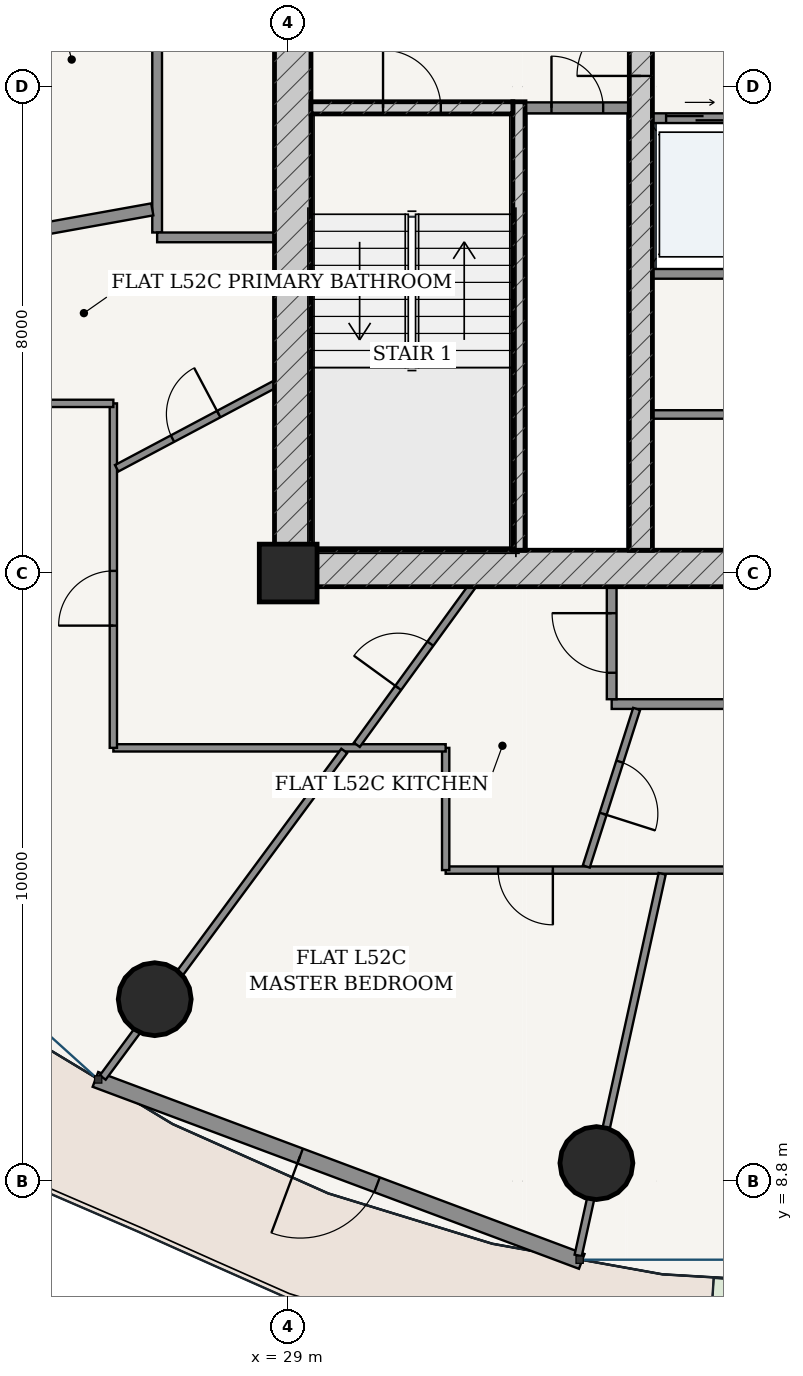
"""IFC4 building model, lengths in metres.
Left out: names, types, materials, properties, quantities, classifications, styles, units other than length and angle.
Written with IfcOpenShell. Run it as: python <this file> out.ifc"""

import sys

from ifc_helpers import new_model, si_unit, direction, frame, frame_2d, origin, origin_2d, place, context, subcontext, project, spatial, rectangle, hollow_circle, extrude, source, transform, mapped, element, fill, save


model = new_model("IFC4")
c1 = context("Model", 3, precision=1e-05, world=origin(), true_north=direction((-0.2419218956, 0.970295726276)))
c2 = subcontext(c1, "Body", "Model", "MODEL_VIEW")
j1 = project(units=[si_unit("LENGTHUNIT", "METRE"), si_unit("PLANEANGLEUNIT", "RADIAN")], contexts=[c1])
p1 = place(None, origin())
s1 = spatial("IfcSite", under=j1, at=p1, CompositionType="ELEMENT")
p2 = place(p1, origin())
s2 = spatial("IfcBuilding", under=s1, at=p2, CompositionType="ELEMENT")
p3 = place(p2, frame((0.0, 0.0, 198.6)))
s3 = spatial("IfcBuildingStorey", under=s2, at=p3, CompositionType="ELEMENT", Elevation=198.6)
p4 = place(p3, frame((29.0, 18.8, 0.0), z_axis=(0.0, 0.0, 1.0), x_axis=(1.0, 0.0, 0.0)))
e1 = element("IfcColumn", 1, at=p4, inside=s3, PredefinedType="COLUMN", context=c2, shape_type="SweptSolid", body=[
    extrude(rectangle(XDim=0.95, YDim=0.95, at=origin_2d()), origin(), (0.0, 0.0, 1.0), 3.7),
])
p5 = place(p3, frame((28.775, 18.875, 0.0), z_axis=(0.0, 0.0, 1.0), x_axis=(1.0, 0.0, 0.0)))
e2 = element("IfcWall", 2, at=p5, inside=s3, PredefinedType="SHEAR", context=c2, shape_type="SweptSolid", body=[
    extrude(rectangle(XDim=18.45, YDim=0.6, at=frame_2d((9.225, 0.0))), origin(), (0.0, 0.0, 1.0), 3.435),
])
p6 = place(p5, frame((8.8, 0.0, 0.0)))
e3 = element("IfcOpeningElement", 3, at=p6, cuts=e2, PredefinedType="OPENING", context=c2, shape_type="SweptSolid", body=[
    extrude(rectangle(XDim=0.85, YDim=2.1, at=frame_2d((0.425, 1.05))), frame((0.0, 0.31, 0.0), z_axis=(0.0, -1.0, 0.0), x_axis=(1.0, 0.0, 0.0)), (0.0, 0.0, 1.0), 0.62),
])
p7 = place(p3, frame((29.075, 19.175, 0.0), z_axis=(0.0, 0.0, 1.0), x_axis=(0.0, 1.0, 0.0)))
e4 = element("IfcWall", 4, at=p7, inside=s3, PredefinedType="SHEAR", context=c2, shape_type="SweptSolid", body=[
    extrude(rectangle(XDim=15.25, YDim=0.6, at=frame_2d((7.625, 0.0))), origin(), (0.0, 0.0, 1.0), 3.435),
])
p8 = place(p7, frame((9.875, 0.0, 0.0)))
e5 = element("IfcOpeningElement", 5, at=p8, cuts=e4, PredefinedType="OPENING", context=c2, shape_type="SweptSolid", body=[
    extrude(rectangle(XDim=1.5, YDim=2.2, at=frame_2d((0.75, 1.1))), frame((0.0, 0.31, 0.0), z_axis=(0.0, -1.0, 0.0), x_axis=(1.0, 0.0, 0.0)), (0.0, 0.0, 1.0), 0.62),
])
p9 = place(p3, frame((32.795, 19.175, 0.0), z_axis=(0.0, 0.0, 1.0), x_axis=(0.0, 1.0, 0.0)))
e6 = element("IfcWall", 6, at=p9, inside=s3, PredefinedType="SOLIDWALL", context=c2, shape_type="SweptSolid", body=[
    extrude(rectangle(XDim=7.375, YDim=0.2, at=frame_2d((3.688, 0.0))), origin(), (0.0, 0.0, 1.0), 3.435),
])
p10 = place(p3, frame((29.375, 26.45, 0.0), z_axis=(0.0, 0.0, 1.0), x_axis=(1.0, 0.0, 0.0)))
e7 = element("IfcWall", 7, at=p10, inside=s3, PredefinedType="SOLIDWALL", context=c2, shape_type="SweptSolid", body=[
    extrude(rectangle(XDim=3.32, YDim=0.2, at=frame_2d((1.66, 0.0))), origin(), (0.0, 0.0, 1.0), 3.435),
])
p11 = place(p10, frame((1.185, 0.0, 0.0)))
e8 = element("IfcOpeningElement", 8, at=p11, cuts=e7, PredefinedType="OPENING", context=c2, shape_type="SweptSolid", body=[
    extrude(rectangle(XDim=0.95, YDim=2.15, at=frame_2d((0.475, 1.075))), frame((0.0, 0.11, 0.0), z_axis=(0.0, -1.0, 0.0), x_axis=(1.0, 0.0, 0.0)), (0.0, 0.0, 1.0), 0.22),
])
p12 = place(p3, frame((34.8, 19.175, 0.0), z_axis=(0.0, 0.0, 1.0), x_axis=(0.0, 1.0, 0.0)))
e9 = element("IfcWall", 9, at=p12, inside=s3, PredefinedType="SHEAR", context=c2, shape_type="SweptSolid", body=[
    extrude(rectangle(XDim=15.25, YDim=0.38, at=frame_2d((7.625, 0.0))), origin(), (0.0, 0.0, 1.0), 3.435),
])
p13 = place(p12, frame((7.8, 0.0, 0.0)))
e10 = element("IfcOpeningElement", 10, at=p13, cuts=e9, PredefinedType="OPENING", context=c2, shape_type="SweptSolid", body=[
    extrude(rectangle(XDim=1.05, YDim=2.15, at=frame_2d((0.525, 1.075))), frame((0.0, 0.2, 0.0), z_axis=(0.0, -1.0, 0.0), x_axis=(1.0, 0.0, 0.0)), (0.0, 0.0, 1.0), 0.4),
])
for number, where, z_axis, x_axis in (
    (11, (26.805, 11.792, 0.0), (0.0, 0.0, 1.0), (1.0, 0.0, 0.0)),
    (12, (34.069, 9.097, 0.0), (0.0, 0.0, 1.0), (1.0, 0.0, 0.0)),
):
    element("IfcColumn", number, at=place(p3, frame(where, z_axis=z_axis, x_axis=x_axis)), inside=s3, PredefinedType="COLUMN", context=c2, shape_type="SweptSolid", body=[
        extrude(hollow_circle(Radius=0.6, WallThickness=0.038, at=origin_2d()), origin(), (0.0, 0.0, 1.0), 3.7),
    ])
p14 = place(p3, frame((25.83, 10.473, 0.0), z_axis=(0.0, 0.0, 1.0), x_axis=(0.936556918375, -0.350515532672, 0.0)))
e13 = element("IfcWall", 13, at=p14, inside=s3, PredefinedType="SOLIDWALL", context=c2, shape_type="SweptSolid", body=[
    extrude(rectangle(XDim=8.539, YDim=0.26, at=frame_2d((4.27, 0.0))), origin(), (0.0, 0.0, 1.0), 3.435),
])
p15 = place(p14, frame((3.594, 0.0, 0.0)))
e14 = element("IfcOpeningElement", 14, at=p15, cuts=e13, PredefinedType="OPENING", context=c2, shape_type="SweptSolid", body=[
    extrude(rectangle(XDim=1.35, YDim=2.2, at=frame_2d((0.675, 1.1))), frame((0.0, 0.14, 0.0), z_axis=(0.0, -1.0, 0.0), x_axis=(1.0, 0.0, 0.0)), (0.0, 0.0, 1.0), 0.28),
])
p16 = place(p3, frame((32.9, 26.45, 0.0), z_axis=(0.0, 0.0, 1.0), x_axis=(1.0, 0.0, 0.0)))
e15 = element("IfcWall", 15, at=p16, inside=s3, PredefinedType="PARTITIONING", context=c2, shape_type="SweptSolid", body=[
    extrude(rectangle(XDim=1.71, YDim=0.18, at=frame_2d((0.855, 0.0))), origin(), (0.0, 0.0, 1.0), 3.435),
])
p17 = place(p16, frame((0.43, 0.0, 0.0)))
e16 = element("IfcOpeningElement", 16, at=p17, cuts=e15, PredefinedType="OPENING", context=c2, shape_type="SweptSolid", body=[
    extrude(rectangle(XDim=0.85, YDim=2.1, at=frame_2d((0.425, 1.05))), frame((0.0, 0.1, 0.0), z_axis=(0.0, -1.0, 0.0), x_axis=(1.0, 0.0, 0.0)), (0.0, 0.0, 1.0), 0.2),
])
p18 = place(p3, frame((34.99, 26.28, 0.0), z_axis=(0.0, 0.0, 1.0), x_axis=(1.0, 0.0, 0.0)))
e17 = element("IfcWall", 17, at=p18, inside=s3, PredefinedType="PARTITIONING", context=c2, shape_type="SweptSolid", body=[
    extrude(rectangle(XDim=6.02, YDim=0.16, at=frame_2d((3.01, 0.0))), origin(), (0.0, 0.0, 1.0), 3.435),
])
p19 = place(p18, frame((0.225, 0.0, 0.0)))
e18 = element("IfcOpeningElement", 18, at=p19, cuts=e17, PredefinedType="OPENING", context=c2, shape_type="SweptSolid", body=[
    extrude(rectangle(XDim=1.1, YDim=2.2, at=frame_2d((0.55, 1.1))), frame((0.0, 0.09, 0.0), z_axis=(0.0, -1.0, 0.0), x_axis=(1.0, 0.0, 0.0)), (0.0, 0.0, 1.0), 0.18),
])
p20 = place(p18, frame((1.705, 0.0, 0.0)))
e19 = element("IfcOpeningElement", 19, at=p20, cuts=e17, PredefinedType="OPENING", context=c2, shape_type="SweptSolid", body=[
    extrude(rectangle(XDim=1.1, YDim=2.2, at=frame_2d((0.55, 1.1))), frame((0.0, 0.09, 0.0), z_axis=(0.0, -1.0, 0.0), x_axis=(1.0, 0.0, 0.0)), (0.0, 0.0, 1.0), 0.18),
])
p21 = place(p3, frame((34.99, 23.72, 0.0), z_axis=(0.0, 0.0, 1.0), x_axis=(1.0, 0.0, 0.0)))
e20 = element("IfcWall", 20, at=p21, inside=s3, PredefinedType="PARTITIONING", context=c2, shape_type="SweptSolid", body=[
    extrude(rectangle(XDim=6.02, YDim=0.16, at=frame_2d((3.01, 0.0))), origin(), (0.0, 0.0, 1.0), 3.435),
])
p22 = place(p3, frame((34.99, 21.407, 0.0), z_axis=(0.0, 0.0, 1.0), x_axis=(1.0, 0.0, 0.0)))
e21 = element("IfcWall", 21, at=p22, inside=s3, PredefinedType="PARTITIONING", context=c2, shape_type="SweptSolid", body=[
    extrude(rectangle(XDim=6.02, YDim=0.14, at=frame_2d((3.01, 0.0))), origin(), (0.0, 0.0, 1.0), 3.435),
])
p23 = place(p22, frame((2.585, 0.0, 0.0)))
e22 = element("IfcOpeningElement", 22, at=p23, cuts=e21, PredefinedType="OPENING", context=c2, shape_type="SweptSolid", body=[
    extrude(rectangle(XDim=0.85, YDim=2.1, at=frame_2d((0.425, 1.05))), frame((0.0, 0.08, 0.0), z_axis=(0.0, -1.0, 0.0), x_axis=(1.0, 0.0, 0.0)), (0.0, 0.0, 1.0), 0.16),
])
p24 = place(p3, frame((26.845, 24.4, 0.0), z_axis=(0.0, 0.0, 1.0), x_axis=(0.0, 1.0, 0.0)))
e23 = element("IfcWall", 23, at=p24, inside=s3, PredefinedType="PARTITIONING", context=c2, shape_type="SweptSolid", body=[
    extrude(rectangle(XDim=10.625, YDim=0.16, at=frame_2d((5.312, 0.0))), origin(), (0.0, 0.0, 1.0), 2.951),
])
p25 = place(p3, frame((26.845, 24.32, 0.0), z_axis=(0.0, 0.0, 1.0), x_axis=(1.0, 0.0, 0.0)))
e24 = element("IfcWall", 24, at=p25, inside=s3, PredefinedType="PARTITIONING", context=c2, shape_type="SweptSolid", body=[
    extrude(rectangle(XDim=1.93, YDim=0.16, at=frame_2d((0.965, 0.0))), origin(), (0.0, 0.0, 1.0), 3.435),
])
p26 = place(p3, frame((34.32, 16.645, 0.0), z_axis=(0.0, 0.0, 1.0), x_axis=(1.0, 0.0, 0.0)))
e25 = element("IfcWall", 25, at=p26, inside=s3, PredefinedType="PARTITIONING", context=c2, shape_type="SweptSolid", body=[
    extrude(rectangle(XDim=14.835, YDim=0.16, at=frame_2d((7.417, 0.0))), origin(), (0.0, 0.0, 1.0), 2.951),
])
p27 = place(p26, frame((11.961, 0.0, 0.0)))
e26 = element("IfcOpeningElement", 26, at=p27, cuts=e25, PredefinedType="OPENING", context=c2, shape_type="SweptSolid", body=[
    extrude(rectangle(XDim=0.98, YDim=2.2, at=frame_2d((0.49, 1.1))), frame((0.0, 0.09, 0.0), z_axis=(0.0, -1.0, 0.0), x_axis=(1.0, 0.0, 0.0)), (0.0, 0.0, 1.0), 0.18),
])
p28 = place(p3, frame((34.32, 16.725, 0.0), z_axis=(0.0, 0.0, 1.0), x_axis=(0.0, 1.0, 0.0)))
e27 = element("IfcWall", 27, at=p28, inside=s3, PredefinedType="PARTITIONING", context=c2, shape_type="SweptSolid", body=[
    extrude(rectangle(XDim=1.85, YDim=0.16, at=frame_2d((0.925, 0.0))), origin(), (0.0, 0.0, 1.0), 3.435),
])
p29 = place(p28, frame((0.435, 0.0, 0.0)))
e28 = element("IfcOpeningElement", 28, at=p29, cuts=e27, PredefinedType="OPENING", context=c2, shape_type="SweptSolid", body=[
    extrude(rectangle(XDim=0.98, YDim=2.2, at=frame_2d((0.49, 1.1))), frame((0.0, 0.09, 0.0), z_axis=(0.0, -1.0, 0.0), x_axis=(1.0, 0.0, 0.0)), (0.0, 0.0, 1.0), 0.18),
])
p30 = place(p3, frame((26.765, 24.781, 0.0), z_axis=(0.0, 0.0, 1.0), x_axis=(-0.984226684914, -0.176911934879, 0.0)))
e29 = element("IfcWall", 29, at=p30, inside=s3, PredefinedType="PARTITIONING", context=c2, shape_type="SweptSolid", body=[
    extrude(rectangle(XDim=10.202, YDim=0.2, at=frame_2d((5.101, 0.0))), origin(), (0.0, 0.0, 1.0), 2.951),
])
p31 = place(p3, frame((40.734, 13.915, 0.0), z_axis=(0.0, 0.0, 1.0), x_axis=(-1.0, 0.0, 0.0)))
e30 = element("IfcWall", 30, at=p31, inside=s3, PredefinedType="PARTITIONING", context=c2, shape_type="SweptSolid", body=[
    extrude(rectangle(XDim=9.144, YDim=0.12, at=frame_2d((4.572, 0.0))), origin(), (0.0, 0.0, 1.0), 2.951),
])
p32 = place(p31, frame((7.381, 0.0, 0.0)))
e31 = element("IfcOpeningElement", 31, at=p32, cuts=e30, PredefinedType="OPENING", context=c2, shape_type="SweptSolid", body=[
    extrude(rectangle(XDim=0.9, YDim=2.15, at=frame_2d((0.45, 1.075))), frame((0.0, 0.07, 0.0), z_axis=(0.0, -1.0, 0.0), x_axis=(1.0, 0.0, 0.0)), (0.0, 0.0, 1.0), 0.14),
])
p33 = place(p31, frame((2.458, 0.0, 0.0)))
e32 = element("IfcOpeningElement", 32, at=p33, cuts=e30, PredefinedType="OPENING", context=c2, shape_type="SweptSolid", body=[
    extrude(rectangle(XDim=0.9, YDim=2.15, at=frame_2d((0.45, 1.075))), frame((0.0, 0.07, 0.0), z_axis=(0.0, -1.0, 0.0), x_axis=(1.0, 0.0, 0.0)), (0.0, 0.0, 1.0), 0.14),
])
p34 = place(p3, frame((31.59, 13.915, 0.0), z_axis=(0.0, 0.0, 1.0), x_axis=(0.0, 1.0, 0.0)))
e33 = element("IfcWall", 33, at=p34, inside=s3, PredefinedType="PARTITIONING", context=c2, shape_type="SweptSolid", body=[
    extrude(rectangle(XDim=2.01, YDim=0.12, at=frame_2d((1.005, 0.0))), origin(), (0.0, 0.0, 1.0), 3.11),
])
p35 = place(p3, frame((31.59, 15.925, 0.0), z_axis=(0.0, 0.0, 1.0), x_axis=(-1.0, 0.0, 0.0)))
e34 = element("IfcWall", 34, at=p35, inside=s3, PredefinedType="PARTITIONING", context=c2, shape_type="SweptSolid", body=[
    extrude(rectangle(XDim=5.465, YDim=0.12, at=frame_2d((2.732, 0.0))), origin(), (0.0, 0.0, 1.0), 2.951),
])
p36 = place(p3, frame((26.125, 15.925, 0.0), z_axis=(0.0, 0.0, 1.0), x_axis=(0.0, 1.0, 0.0)))
e35 = element("IfcWall", 35, at=p36, inside=s3, PredefinedType="PARTITIONING", context=c2, shape_type="SweptSolid", body=[
    extrude(rectangle(XDim=5.665, YDim=0.12, at=frame_2d((2.833, 0.0))), origin(), (0.0, 0.0, 1.0), 2.951),
])
p37 = place(p36, frame((2.01, 0.0, 0.0)))
e36 = element("IfcOpeningElement", 36, at=p37, cuts=e35, PredefinedType="OPENING", context=c2, shape_type="SweptSolid", body=[
    extrude(rectangle(XDim=0.9, YDim=2.15, at=frame_2d((0.45, 1.075))), frame((0.0, 0.07, 0.0), z_axis=(0.0, -1.0, 0.0), x_axis=(1.0, 0.0, 0.0)), (0.0, 0.0, 1.0), 0.14),
])
p38 = place(p3, frame((26.125, 21.59, 0.0), z_axis=(0.0, 0.0, 1.0), x_axis=(-1.0, 0.0, 0.0)))
e37 = element("IfcWall", 37, at=p38, inside=s3, PredefinedType="PARTITIONING", context=c2, shape_type="SweptSolid", body=[
    extrude(rectangle(XDim=2.01, YDim=0.12, at=frame_2d((1.005, 0.0))), origin(), (0.0, 0.0, 1.0), 3.11),
])
p39 = place(p3, frame((29.922, 15.875, 0.0), z_axis=(0.0, 0.0, 1.0), x_axis=(-0.594524636617, -0.804077394568, 0.0)))
e38 = element("IfcWall", 38, at=p39, inside=s3, PredefinedType="PARTITIONING", context=c2, shape_type="SweptSolid", body=[
    extrude(rectangle(XDim=6.68, YDim=0.12, at=frame_2d((3.34, 0.0))), origin(), (0.0, 0.0, 1.0), 2.951),
])
p40 = place(p3, frame((35.15, 13.854, 0.0), z_axis=(0.0, 0.0, 1.0), x_axis=(-0.214942949264, -0.976626606519, 0.0)))
e39 = element("IfcWall", 39, at=p40, inside=s3, PredefinedType="PARTITIONING", context=c2, shape_type="SweptSolid", body=[
    extrude(rectangle(XDim=6.427, YDim=0.12, at=frame_2d((3.213, 0.0))), origin(), (0.0, 0.0, 1.0), 2.951),
])
p41 = place(p3, frame((28.775, 21.901, 0.0), z_axis=(0.0, 0.0, 1.0), x_axis=(-0.883156592468, -0.46907828044, 0.0)))
e40 = element("IfcWall", 40, at=p41, inside=s3, PredefinedType="PARTITIONING", context=c2, shape_type="SweptSolid", body=[
    extrude(rectangle(XDim=2.938, YDim=0.12, at=frame_2d((1.469, 0.0))), origin(), (0.0, 0.0, 1.0), 3.435),
])
p42 = place(p41, frame((1.039, 0.0, 0.0)))
e41 = element("IfcOpeningElement", 41, at=p42, cuts=e40, PredefinedType="OPENING", context=c2, shape_type="SweptSolid", body=[
    extrude(rectangle(XDim=0.86, YDim=2.15, at=frame_2d((0.43, 1.075))), frame((0.0, 0.07, 0.0), z_axis=(0.0, -1.0, 0.0), x_axis=(1.0, 0.0, 0.0)), (0.0, 0.0, 1.0), 0.14),
])
p43 = place(p3, frame((32.019, 18.575, 0.0), z_axis=(0.0, 0.0, 1.0), x_axis=(-0.588135570825, -0.808762357143, 0.0)))
e42 = element("IfcWall", 42, at=p43, inside=s3, PredefinedType="PARTITIONING", context=c2, shape_type="SweptSolid", body=[
    extrude(rectangle(XDim=3.215, YDim=0.12, at=frame_2d((1.607, 0.0))), origin(), (0.0, 0.0, 1.0), 3.435),
])
p44 = place(p43, frame((1.157, 0.0, 0.0)))
e43 = element("IfcOpeningElement", 43, at=p44, cuts=e42, PredefinedType="OPENING", context=c2, shape_type="SweptSolid", body=[
    extrude(rectangle(XDim=0.9, YDim=2.15, at=frame_2d((0.45, 1.075))), frame((0.0, 0.07, 0.0), z_axis=(0.0, -1.0, 0.0), x_axis=(1.0, 0.0, 0.0)), (0.0, 0.0, 1.0), 0.14),
])
p45 = place(p3, frame((34.73, 16.565, 0.0), z_axis=(0.0, 0.0, 1.0), x_axis=(-0.304300161081, -0.952576197459, 0.0)))
e44 = element("IfcWall", 44, at=p45, inside=s3, PredefinedType="PARTITIONING", context=c2, shape_type="SweptSolid", body=[
    extrude(rectangle(XDim=2.72, YDim=0.12, at=frame_2d((1.36, 0.0))), origin(), (0.0, 0.0, 1.0), 3.11),
])
p46 = place(p45, frame((0.91, 0.0, 0.0)))
e45 = element("IfcOpeningElement", 45, at=p46, cuts=e44, PredefinedType="OPENING", context=c2, shape_type="SweptSolid", body=[
    extrude(rectangle(XDim=0.9, YDim=2.15, at=frame_2d((0.45, 1.075))), frame((0.0, 0.07, 0.0), z_axis=(0.0, -1.0, 0.0), x_axis=(1.0, 0.0, 0.0)), (0.0, 0.0, 1.0), 0.14),
])
m1 = source(origin(), c2, "Body", "SweptSolid", [
    extrude(rectangle(XDim=1.35, YDim=2.2, at=frame_2d((0.675, 1.1))), frame((0.0, 0.025, 0.0), z_axis=(0.0, -1.0, 0.0), x_axis=(1.0, 0.0, 0.0)), (0.0, 0.0, 1.0), 0.05),
])
p47 = place(p15, frame((1.35, 0.0, 0.0), z_axis=(0.0, 0.0, 1.0), x_axis=(-1.0, 0.0, 0.0)))
e46 = element("IfcDoor", 46, at=p47, inside=s3, OperationType="SINGLE_SWING_RIGHT", PredefinedType="DOOR", context=c2, shape_type="MappedRepresentation", body=[
    mapped(m1, transform((0.0, 0.0, 0.0), scale=1.0)),
])
fill(e14, e46)
m2 = source(origin(), c2, "Body", "SweptSolid", [
    extrude(rectangle(XDim=1.05, YDim=2.15, at=frame_2d((0.525, 1.075))), frame((0.0, 0.025, 0.0), z_axis=(0.0, -1.0, 0.0), x_axis=(1.0, 0.0, 0.0)), (0.0, 0.0, 1.0), 0.05),
])
p48 = place(p13, origin())
e47 = element("IfcDoor", 47, at=p48, inside=s3, OperationType="SINGLE_SWING_LEFT", PredefinedType="DOOR", context=c2, shape_type="MappedRepresentation", body=[
    mapped(m2, transform((0.0, 0.0, 0.0), scale=1.0)),
])
fill(e10, e47)
m3 = source(origin(), c2, "Body", "SweptSolid", [
    extrude(rectangle(XDim=0.95, YDim=2.15, at=frame_2d((0.475, 1.075))), frame((0.0, 0.025, 0.0), z_axis=(0.0, -1.0, 0.0), x_axis=(1.0, 0.0, 0.0)), (0.0, 0.0, 1.0), 0.05),
])
p49 = place(p11, origin())
e48 = element("IfcDoor", 48, at=p49, inside=s3, OperationType="SINGLE_SWING_LEFT", PredefinedType="DOOR", context=c2, shape_type="MappedRepresentation", body=[
    mapped(m3, transform((0.0, 0.0, 0.0), scale=1.0)),
])
fill(e8, e48)
m4 = source(origin(), c2, "Body", "SweptSolid", [
    extrude(rectangle(XDim=0.85, YDim=2.1, at=frame_2d((0.425, 1.05))), frame((0.0, 0.025, 0.0), z_axis=(0.0, -1.0, 0.0), x_axis=(1.0, 0.0, 0.0)), (0.0, 0.0, 1.0), 0.05),
])
p50 = place(p17, origin())
e49 = element("IfcDoor", 49, at=p50, inside=s3, OperationType="SINGLE_SWING_LEFT", PredefinedType="DOOR", context=c2, shape_type="MappedRepresentation", body=[
    mapped(m4, transform((0.0, 0.0, 0.0), scale=1.0)),
])
fill(e16, e49)
m5 = source(origin(), c2, "Body", "SweptSolid", [
    extrude(rectangle(XDim=1.1, YDim=2.2, at=frame_2d((0.55, 1.1))), frame((0.0, 0.025, 0.0), z_axis=(0.0, -1.0, 0.0), x_axis=(1.0, 0.0, 0.0)), (0.0, 0.0, 1.0), 0.05),
])
p51 = place(p19, origin())
e50 = element("IfcDoor", 50, at=p51, inside=s3, OperationType="DOUBLE_DOOR_SLIDING", PredefinedType="DOOR", context=c2, shape_type="MappedRepresentation", body=[
    mapped(m5, transform((0.0, 0.0, 0.0), scale=1.0)),
])
fill(e18, e50)
m6 = source(origin(), c2, "Body", "SweptSolid", [
    extrude(rectangle(XDim=0.98, YDim=2.2, at=frame_2d((0.49, 1.1))), frame((0.0, 0.025, 0.0), z_axis=(0.0, -1.0, 0.0), x_axis=(1.0, 0.0, 0.0)), (0.0, 0.0, 1.0), 0.05),
])
p52 = place(p29, origin())
e51 = element("IfcDoor", 51, at=p52, inside=s3, OperationType="SINGLE_SWING_RIGHT", PredefinedType="DOOR", context=c2, shape_type="MappedRepresentation", body=[
    mapped(m6, transform((0.0, 0.0, 0.0), scale=1.0)),
])
fill(e28, e51)
m7 = source(origin(), c2, "Body", "SweptSolid", [
    extrude(rectangle(XDim=0.9, YDim=2.15, at=frame_2d((0.45, 1.075))), frame((0.0, 0.025, 0.0), z_axis=(0.0, -1.0, 0.0), x_axis=(1.0, 0.0, 0.0)), (0.0, 0.0, 1.0), 0.05),
])
p53 = place(p44, frame((0.9, 0.0, 0.0), z_axis=(0.0, 0.0, 1.0), x_axis=(-1.0, 0.0, 0.0)))
e52 = element("IfcDoor", 52, at=p53, inside=s3, OperationType="SINGLE_SWING_LEFT", PredefinedType="DOOR", context=c2, shape_type="MappedRepresentation", body=[
    mapped(m7, transform((0.0, 0.0, 0.0), scale=1.0)),
])
fill(e43, e52)
p54 = place(p46, origin())
e53 = element("IfcDoor", 53, at=p54, inside=s3, OperationType="SINGLE_SWING_RIGHT", PredefinedType="DOOR", context=c2, shape_type="MappedRepresentation", body=[
    mapped(m7, transform((0.0, 0.0, 0.0), scale=1.0)),
])
fill(e45, e53)
p55 = place(p32, origin())
e54 = element("IfcDoor", 54, at=p55, inside=s3, OperationType="SINGLE_SWING_LEFT", PredefinedType="DOOR", context=c2, shape_type="MappedRepresentation", body=[
    mapped(m7, transform((0.0, 0.0, 0.0), scale=1.0)),
])
fill(e31, e54)
m8 = source(origin(), c2, "Body", "SweptSolid", [
    extrude(rectangle(XDim=0.86, YDim=2.15, at=frame_2d((0.43, 1.075))), frame((0.0, 0.025, 0.0), z_axis=(0.0, -1.0, 0.0), x_axis=(1.0, 0.0, 0.0)), (0.0, 0.0, 1.0), 0.05),
])
p56 = place(p42, frame((0.86, 0.0, 0.0), z_axis=(0.0, 0.0, 1.0), x_axis=(-1.0, 0.0, 0.0)))
e55 = element("IfcDoor", 55, at=p56, inside=s3, OperationType="SINGLE_SWING_RIGHT", PredefinedType="DOOR", context=c2, shape_type="MappedRepresentation", body=[
    mapped(m8, transform((0.0, 0.0, 0.0), scale=1.0)),
])
fill(e41, e55)
p57 = place(p37, origin())
e56 = element("IfcDoor", 56, at=p57, inside=s3, OperationType="SINGLE_SWING_LEFT", PredefinedType="DOOR", context=c2, shape_type="MappedRepresentation", body=[
    mapped(m7, transform((0.0, 0.0, 0.0), scale=1.0)),
])
fill(e36, e56)
save(model, sys.argv[1])
